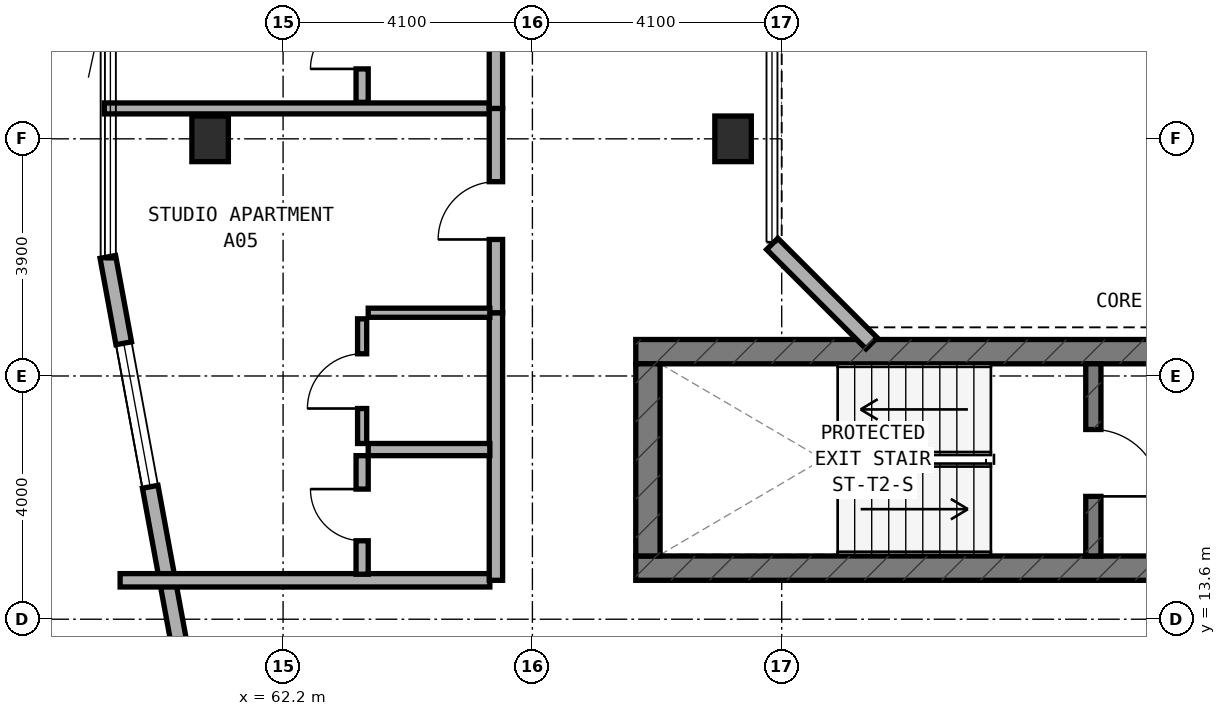
"""IFC4 building model, lengths in metres.
Left out: names, types, materials, properties, quantities, classifications, styles, units other than length and angle.
Written with IfcOpenShell. Run it as: python <this file> out.ifc"""

import sys

from ifc_helpers import new_model, si_unit, direction, frame, frame_2d, origin, origin_2d, place, context, subcontext, project, spatial, rectangle, extrude, element, fill, save


model = new_model("IFC4")
c1 = context("Model", 3, precision=1e-05, world=origin(), true_north=direction((0.0, 1.0)))
c2 = subcontext(c1, "Body", "Model", "MODEL_VIEW")
j1 = project(units=[si_unit("LENGTHUNIT", "METRE"), si_unit("PLANEANGLEUNIT", "RADIAN")], contexts=[c1])
p1 = place(None, origin())
s1 = spatial("IfcSite", under=j1, at=p1, CompositionType="ELEMENT")
p2 = place(p1, origin())
s2 = spatial("IfcBuilding", under=s1, at=p2, CompositionType="ELEMENT")
p3 = place(p2, frame((0.0, 0.0, 95.0)))
s3 = spatial("IfcBuildingStorey", under=s2, at=p3, CompositionType="ELEMENT", Elevation=95.0)
p4 = place(p3, frame((68.0, 14.44, 0.0), z_axis=(0.0, 0.0, 1.0), x_axis=(1.0, 0.0, 0.0)))
e1 = element("IfcWall", 1, at=p4, inside=s3, PredefinedType="SHEAR", context=c2, shape_type="SweptSolid", body=[
    extrude(rectangle(XDim=18.2, YDim=0.4, at=frame_2d((9.1, 0.0))), origin(), (0.0, 0.0, 1.0), 3.5),
])
p5 = place(p4, frame((9.15, 0.0, 0.0)))
e2 = element("IfcOpeningElement", 2, at=p5, cuts=e1, PredefinedType="OPENING", context=c2, shape_type="SweptSolid", body=[
    extrude(rectangle(XDim=1.2, YDim=2.15, at=frame_2d((0.6, 1.075))), frame((0.0, 0.21, 0.0), z_axis=(0.0, -1.0, 0.0), x_axis=(1.0, 0.0, 0.0)), (0.0, 0.0, 1.0), 0.42),
])
p6 = place(p4, frame((16.75, 0.0, 0.0)))
e3 = element("IfcOpeningElement", 3, at=p6, cuts=e1, PredefinedType="OPENING", context=c2, shape_type="SweptSolid", body=[
    extrude(rectangle(XDim=0.85, YDim=2.1, at=frame_2d((0.425, 1.05))), frame((0.0, 0.21, 0.0), z_axis=(0.0, -1.0, 0.0), x_axis=(1.0, 0.0, 0.0)), (0.0, 0.0, 1.0), 0.42),
])
p7 = place(p4, frame((12.35, 0.0, 0.0)))
e4 = element("IfcOpeningElement", 4, at=p7, cuts=e1, PredefinedType="OPENING", context=c2, shape_type="SweptSolid", body=[
    extrude(rectangle(XDim=1.1, YDim=2.15, at=frame_2d((0.55, 1.075))), frame((0.0, 0.21, 0.0), z_axis=(0.0, -1.0, 0.0), x_axis=(1.0, 0.0, 0.0)), (0.0, 0.0, 1.0), 0.42),
])
p8 = place(p4, frame((13.95, 0.0, 0.0)))
e5 = element("IfcOpeningElement", 5, at=p8, cuts=e1, PredefinedType="OPENING", context=c2, shape_type="SweptSolid", body=[
    extrude(rectangle(XDim=1.1, YDim=2.15, at=frame_2d((0.55, 1.075))), frame((0.0, 0.21, 0.0), z_axis=(0.0, -1.0, 0.0), x_axis=(1.0, 0.0, 0.0)), (0.0, 0.0, 1.0), 0.42),
])
p9 = place(p3, frame((68.0, 18.0, 0.0), z_axis=(0.0, 0.0, 1.0), x_axis=(1.0, 0.0, 0.0)))
e6 = element("IfcWall", 6, at=p9, inside=s3, PredefinedType="SHEAR", context=c2, shape_type="SweptSolid", body=[
    extrude(rectangle(XDim=18.2, YDim=0.4, at=frame_2d((9.1, 0.0))), origin(), (0.0, 0.0, 1.0), 3.5),
])
p10 = place(p3, frame((68.2, 14.64, 0.0), z_axis=(0.0, 0.0, 1.0), x_axis=(0.0, 1.0, 0.0)))
e7 = element("IfcWall", 7, at=p10, inside=s3, PredefinedType="SHEAR", context=c2, shape_type="SweptSolid", body=[
    extrude(rectangle(XDim=3.16, YDim=0.4, at=frame_2d((1.58, 0.0))), origin(), (0.0, 0.0, 1.0), 3.5),
])
p11 = place(p3, frame((75.525, 14.64, 0.0), z_axis=(0.0, 0.0, 1.0), x_axis=(0.0, 1.0, 0.0)))
e8 = element("IfcWall", 8, at=p11, inside=s3, PredefinedType="STANDARD", context=c2, shape_type="SweptSolid", body=[
    extrude(rectangle(XDim=3.16, YDim=0.25, at=frame_2d((1.58, 0.0))), origin(), (0.0, 0.0, 1.0), 3.25),
])
p12 = place(p11, frame((0.98, 0.0, 0.0)))
e9 = element("IfcOpeningElement", 9, at=p12, cuts=e8, PredefinedType="OPENING", context=c2, shape_type="SweptSolid", body=[
    extrude(rectangle(XDim=1.1, YDim=2.15, at=frame_2d((0.55, 1.075))), frame((0.0, 0.135, 0.0), z_axis=(0.0, -1.0, 0.0), x_axis=(1.0, 0.0, 0.0)), (0.0, 0.0, 1.0), 0.27),
])
for number, where, z_axis, x_axis in (
    (10, (61.0, 21.5, 0.0), (0.0, 0.0, 1.0), (1.0, 0.0, 0.0)),
    (11, (69.6, 21.5, 0.0), (0.0, 0.0, 1.0), (1.0, 0.0, 0.0)),
):
    element("IfcColumn", number, at=place(p3, frame(where, z_axis=z_axis, x_axis=x_axis)), inside=s3, PredefinedType="COLUMN", context=c2, shape_type="SweptSolid", body=[
        extrude(rectangle(XDim=0.6, YDim=0.75, at=origin_2d()), origin(), (0.0, 0.0, 1.0), 3.5),
    ])
p13 = place(p3, frame((59.318, 19.558, 0.0), z_axis=(0.0, 0.0, 1.0), x_axis=(0.181209963057, -0.983444431215, 0.0)))
e12 = element("IfcWall", 12, at=p13, inside=s3, PredefinedType="STANDARD", context=c2, shape_type="SweptSolid", body=[
    extrude(rectangle(XDim=8.889, YDim=0.26, at=frame_2d((4.445, 0.0))), origin(), (0.0, 0.0, 1.0), 3.25),
])
p14 = place(p13, frame((1.444, 0.0, 0.8)))
e13 = element("IfcOpeningElement", 13, at=p14, cuts=e12, PredefinedType="OPENING", context=c2, shape_type="SweptSolid", body=[
    extrude(rectangle(XDim=2.4, YDim=1.6, at=frame_2d((1.2, 0.8))), frame((0.0, 0.14, 0.0), z_axis=(0.0, -1.0, 0.0), x_axis=(1.0, 0.0, 0.0)), (0.0, 0.0, 1.0), 0.28),
])
p15 = place(p3, frame((70.244, 19.772, 0.0), z_axis=(0.0, 0.0, 1.0), x_axis=(0.707106781187, -0.707106781187, 0.0)))
e14 = element("IfcWall", 14, at=p15, inside=s3, PredefinedType="STANDARD", context=c2, shape_type="SweptSolid", body=[
    extrude(rectangle(XDim=2.311, YDim=0.26, at=frame_2d((1.155, 0.0))), origin(), (0.0, 0.0, 1.0), 3.25),
])
p16 = place(p3, frame((59.52, 14.24, 0.0), z_axis=(0.0, 0.0, 1.0), x_axis=(1.0, 0.0, 0.0)))
e15 = element("IfcWall", 15, at=p16, inside=s3, PredefinedType="SOLIDWALL", context=c2, shape_type="SweptSolid", body=[
    extrude(rectangle(XDim=6.08, YDim=0.22, at=frame_2d((3.04, 0.0))), origin(), (0.0, 0.0, 1.0), 2.945),
])
p17 = place(p3, frame((59.26, 22.0, 0.0), z_axis=(0.0, 0.0, 1.0), x_axis=(1.0, 0.0, 0.0)))
e16 = element("IfcWall", 16, at=p17, inside=s3, PredefinedType="SOLIDWALL", context=c2, shape_type="SweptSolid", body=[
    extrude(rectangle(XDim=6.44, YDim=0.18, at=frame_2d((3.22, 0.0))), origin(), (0.0, 0.0, 1.0), 2.945),
])
p18 = place(p3, frame((65.7, 14.24, 0.0), z_axis=(0.0, 0.0, 1.0), x_axis=(0.0, 1.0, 0.0)))
e17 = element("IfcWall", 17, at=p18, inside=s3, PredefinedType="SOLIDWALL", context=c2, shape_type="SweptSolid", body=[
    extrude(rectangle(XDim=4.4, YDim=0.22, at=frame_2d((2.2, 0.0))), origin(), (0.0, 0.0, 1.0), 3.22),
])
p19 = place(p3, frame((65.7, 18.64, 0.0), z_axis=(0.0, 0.0, 1.0), x_axis=(0.0, 1.0, 0.0)))
e18 = element("IfcWall", 18, at=p19, inside=s3, PredefinedType="SOLIDWALL", context=c2, shape_type="SweptSolid", body=[
    extrude(rectangle(XDim=3.36, YDim=0.22, at=frame_2d((1.68, 0.0))), origin(), (0.0, 0.0, 1.0), 2.825),
])
p20 = place(p19, frame((1.205, 0.0, 0.0)))
e19 = element("IfcOpeningElement", 19, at=p20, cuts=e18, PredefinedType="OPENING", context=c2, shape_type="SweptSolid", body=[
    extrude(rectangle(XDim=0.95, YDim=2.1, at=frame_2d((0.475, 1.05))), frame((0.0, 0.12, 0.0), z_axis=(0.0, -1.0, 0.0), x_axis=(1.0, 0.0, 0.0)), (0.0, 0.0, 1.0), 0.24),
])
p21 = place(p3, frame((63.6, 16.39, 0.0), z_axis=(0.0, 0.0, 1.0), x_axis=(1.0, 0.0, 0.0)))
e20 = element("IfcWall", 20, at=p21, inside=s3, PredefinedType="PLUMBINGWALL", context=c2, shape_type="SweptSolid", body=[
    extrude(rectangle(XDim=2.0, YDim=0.2, at=frame_2d((1.0, 0.0))), origin(), (0.0, 0.0, 1.0), 3.22),
])
p22 = place(p3, frame((63.6, 18.64, 0.0), z_axis=(0.0, 0.0, 1.0), x_axis=(1.0, 0.0, 0.0)))
e21 = element("IfcWall", 21, at=p22, inside=s3, PredefinedType="PARTITIONING", context=c2, shape_type="SweptSolid", body=[
    extrude(rectangle(XDim=2.0, YDim=0.15, at=frame_2d((1.0, 0.0))), origin(), (0.0, 0.0, 1.0), 3.22),
])
p23 = place(p3, frame((63.5, 14.34, 0.0), z_axis=(0.0, 0.0, 1.0), x_axis=(0.0, 1.0, 0.0)))
e22 = element("IfcWall", 22, at=p23, inside=s3, PredefinedType="PLUMBINGWALL", context=c2, shape_type="SweptSolid", body=[
    extrude(rectangle(XDim=1.95, YDim=0.2, at=frame_2d((0.975, 0.0))), origin(), (0.0, 0.0, 1.0), 3.22),
])
p24 = place(p23, frame((0.55, 0.0, 0.0)))
e23 = element("IfcOpeningElement", 23, at=p24, cuts=e22, PredefinedType="OPENING", context=c2, shape_type="SweptSolid", body=[
    extrude(rectangle(XDim=0.85, YDim=2.1, at=frame_2d((0.425, 1.05))), frame((0.0, 0.11, 0.0), z_axis=(0.0, -1.0, 0.0), x_axis=(1.0, 0.0, 0.0)), (0.0, 0.0, 1.0), 0.22),
])
p25 = place(p3, frame((63.5, 16.49, 0.0), z_axis=(0.0, 0.0, 1.0), x_axis=(0.0, 1.0, 0.0)))
e24 = element("IfcWall", 24, at=p25, inside=s3, PredefinedType="PARTITIONING", context=c2, shape_type="SweptSolid", body=[
    extrude(rectangle(XDim=2.05, YDim=0.15, at=frame_2d((1.025, 0.0))), origin(), (0.0, 0.0, 1.0), 3.22),
])
p26 = place(p25, frame((0.575, 0.0, 0.0)))
e25 = element("IfcOpeningElement", 25, at=p26, cuts=e24, PredefinedType="OPENING", context=c2, shape_type="SweptSolid", body=[
    extrude(rectangle(XDim=0.9, YDim=2.1, at=frame_2d((0.45, 1.05))), frame((0.0, 0.085, 0.0), z_axis=(0.0, -1.0, 0.0), x_axis=(1.0, 0.0, 0.0)), (0.0, 0.0, 1.0), 0.17),
])
p27 = place(p3, frame((65.7, 22.0, 0.0), z_axis=(0.0, 0.0, 1.0), x_axis=(0.0, 1.0, 0.0)))
e26 = element("IfcWall", 26, at=p27, inside=s3, PredefinedType="SOLIDWALL", context=c2, shape_type="SweptSolid", body=[
    extrude(rectangle(XDim=4.4, YDim=0.22, at=frame_2d((2.2, 0.0))), origin(), (0.0, 0.0, 1.0), 3.22),
])
p28 = place(p3, frame((63.5, 22.1, 0.0), z_axis=(0.0, 0.0, 1.0), x_axis=(0.0, 1.0, 0.0)))
e27 = element("IfcWall", 27, at=p28, inside=s3, PredefinedType="PLUMBINGWALL", context=c2, shape_type="SweptSolid", body=[
    extrude(rectangle(XDim=1.95, YDim=0.2, at=frame_2d((0.975, 0.0))), origin(), (0.0, 0.0, 1.0), 3.22),
])
p29 = place(p28, frame((0.55, 0.0, 0.0)))
e28 = element("IfcOpeningElement", 28, at=p29, cuts=e27, PredefinedType="OPENING", context=c2, shape_type="SweptSolid", body=[
    extrude(rectangle(XDim=0.85, YDim=2.1, at=frame_2d((0.425, 1.05))), frame((0.0, 0.11, 0.0), z_axis=(0.0, -1.0, 0.0), x_axis=(1.0, 0.0, 0.0)), (0.0, 0.0, 1.0), 0.22),
])
p30 = place(p14, origin())
e29 = element("IfcWindow", 29, at=p30, inside=s3, PartitioningType="SINGLE_PANEL", PredefinedType="WINDOW", context=c2, shape_type="SweptSolid", body=[
    extrude(rectangle(XDim=2.4, YDim=1.6, at=frame_2d((1.2, 0.8))), frame((0.0, 0.03, 0.0), z_axis=(0.0, -1.0, 0.0), x_axis=(1.0, 0.0, 0.0)), (0.0, 0.0, 1.0), 0.06),
])
fill(e13, e29)
p31 = place(p12, frame((1.1, 0.0, 0.0), z_axis=(0.0, 0.0, 1.0), x_axis=(-1.0, 0.0, 0.0)))
e30 = element("IfcDoor", 30, at=p31, inside=s3, OperationType="SINGLE_SWING_RIGHT", PredefinedType="DOOR", context=c2, shape_type="SweptSolid", body=[
    extrude(rectangle(XDim=1.1, YDim=2.15, at=frame_2d((0.55, 1.075))), frame((0.0, 0.025, 0.0), z_axis=(0.0, -1.0, 0.0), x_axis=(1.0, 0.0, 0.0)), (0.0, 0.0, 1.0), 0.05),
])
fill(e9, e30)
p32 = place(p20, origin())
e31 = element("IfcDoor", 31, at=p32, inside=s3, OperationType="SINGLE_SWING_LEFT", PredefinedType="DOOR", context=c2, shape_type="SweptSolid", body=[
    extrude(rectangle(XDim=0.95, YDim=2.1, at=frame_2d((0.475, 1.05))), frame((0.0, 0.025, 0.0), z_axis=(0.0, -1.0, 0.0), x_axis=(1.0, 0.0, 0.0)), (0.0, 0.0, 1.0), 0.05),
])
fill(e19, e31)
p33 = place(p24, origin())
e32 = element("IfcDoor", 32, at=p33, inside=s3, OperationType="SINGLE_SWING_RIGHT", PredefinedType="DOOR", context=c2, shape_type="SweptSolid", body=[
    extrude(rectangle(XDim=0.85, YDim=2.1, at=frame_2d((0.425, 1.05))), frame((0.0, 0.025, 0.0), z_axis=(0.0, -1.0, 0.0), x_axis=(1.0, 0.0, 0.0)), (0.0, 0.0, 1.0), 0.05),
])
fill(e23, e32)
p34 = place(p26, origin())
e33 = element("IfcDoor", 33, at=p34, inside=s3, OperationType="SINGLE_SWING_LEFT", PredefinedType="DOOR", context=c2, shape_type="SweptSolid", body=[
    extrude(rectangle(XDim=0.9, YDim=2.1, at=frame_2d((0.45, 1.05))), frame((0.0, 0.025, 0.0), z_axis=(0.0, -1.0, 0.0), x_axis=(1.0, 0.0, 0.0)), (0.0, 0.0, 1.0), 0.05),
])
fill(e25, e33)
p35 = place(p29, origin())
e34 = element("IfcDoor", 34, at=p35, inside=s3, OperationType="SINGLE_SWING_LEFT", PredefinedType="DOOR", context=c2, shape_type="SweptSolid", body=[
    extrude(rectangle(XDim=0.85, YDim=2.1, at=frame_2d((0.425, 1.05))), frame((0.0, 0.025, 0.0), z_axis=(0.0, -1.0, 0.0), x_axis=(1.0, 0.0, 0.0)), (0.0, 0.0, 1.0), 0.05),
])
fill(e28, e34)
save(model, sys.argv[1])
